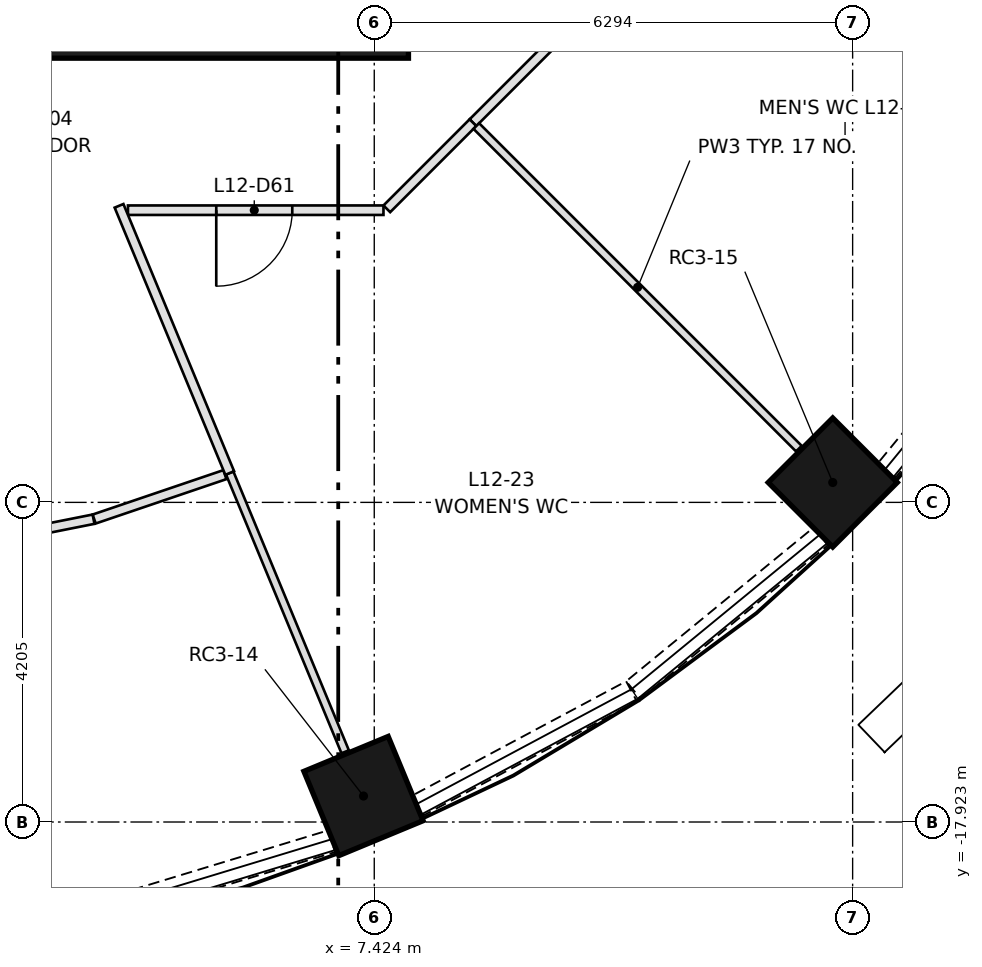
"""IFC4 building model, lengths in metres.
Left out: names, types, materials, properties, quantities, classifications, styles, units other than length and angle.
Written with IfcOpenShell. Run it as: python <this file> out.ifc"""

import sys

from ifc_helpers import new_model, si_unit, direction, frame, frame_2d, origin, origin_2d, place, context, subcontext, project, spatial, rectangle, extrude, element, fill, save


model = new_model("IFC4")
c1 = context("Model", 3, precision=1e-05, world=origin(), true_north=direction((0.0, 1.0)))
c2 = subcontext(c1, "Body", "Model", "MODEL_VIEW")
j1 = project(units=[si_unit("LENGTHUNIT", "METRE"), si_unit("PLANEANGLEUNIT", "RADIAN")], contexts=[c1])
p1 = place(None, origin())
s1 = spatial("IfcSite", under=j1, at=p1, CompositionType="ELEMENT")
p2 = place(p1, origin())
s2 = spatial("IfcBuilding", under=s1, at=p2, CompositionType="ELEMENT")
p3 = place(p2, frame((0.0, 0.0, 48.1)))
s3 = spatial("IfcBuildingStorey", under=s2, at=p3, CompositionType="ELEMENT", Elevation=48.1)
for number, where, z_axis, x_axis in (
    (1, (7.282, -17.582, 0.0), (0.0, 0.0, 1.0), (0.383, -0.924, 0.0)),
    (2, (13.456, -13.456, 0.0), (0.0, 0.0, 1.0), (0.707, -0.707, 0.0)),
):
    element("IfcColumn", number, at=place(p3, frame(where, z_axis=z_axis, x_axis=x_axis)), inside=s3, PredefinedType="COLUMN", context=c2, shape_type="SweptSolid", body=[
        extrude(rectangle(XDim=1.2, YDim=1.2, at=origin_2d()), origin(), (0.0, 0.0, 1.0), 3.65),
    ])
p4 = place(p3, frame((-7.874, -7.424, 0.0), z_axis=(0.0, 0.0, 1.0), x_axis=(1.0, 0.0, 0.0)))
e3 = element("IfcWall", 3, at=p4, inside=s3, PredefinedType="SHEAR", context=c2, shape_type="SweptSolid", body=[
    extrude(rectangle(XDim=15.748, YDim=0.9, at=frame_2d((7.874, 0.0))), origin(), (0.0, 0.0, 1.0), 3.65),
])
p5 = place(p3, frame((3.814, -19.102, 0.0), z_axis=(0.0, 0.0, 1.0), x_axis=(0.956849017819, 0.290585541792, 0.0)))
e4 = element("IfcWall", 4, at=p5, inside=s3, PredefinedType="SOLIDWALL", context=c2, shape_type="SweptSolid", body=[
    extrude(rectangle(XDim=3.188, YDim=0.3, at=frame_2d((1.594, 0.0))), origin(), (0.0, 0.0, 1.0), 0.9),
])
p6 = place(p3, frame((7.998, -17.706, 0.0), z_axis=(0.0, 0.0, 1.0), x_axis=(0.881994263934, 0.471260138764, 0.0)))
e5 = element("IfcWall", 5, at=p6, inside=s3, PredefinedType="SOLIDWALL", context=c2, shape_type="SweptSolid", body=[
    extrude(rectangle(XDim=3.187, YDim=0.3, at=frame_2d((1.593, 0.0))), origin(), (0.0, 0.0, 1.0), 0.9),
])
for number, where, z_axis, x_axis in (
    (6, (10.833, -16.188, 0.0), (0.0, 0.0, 1.0), (0.773, 0.634, 0.0)),
    (7, (14.166, -13.298, 0.0), (0.0, 0.0, 1.0), (0.634, 0.773, 0.0)),
):
    element("IfcWall", number, at=place(p3, frame(where, z_axis=z_axis, x_axis=x_axis)), inside=s3, PredefinedType="SOLIDWALL", context=c2, shape_type="SweptSolid", body=[
        extrude(rectangle(XDim=3.188, YDim=0.3, at=frame_2d((1.594, 0.0))), origin(), (0.0, 0.0, 1.0), 0.9),
    ])
p7 = place(p3, frame((9.856, -7.589, 0.0), z_axis=(0.0, 0.0, 1.0), x_axis=(-0.70718294931, -0.707030604857, 0.0)))
e8 = element("IfcWall", 8, at=p7, inside=s3, PredefinedType="PARTITIONING", context=c2, shape_type="SweptSolid", body=[
    extrude(rectangle(XDim=1.603, YDim=0.125, at=frame_2d((0.801, 0.0))), origin(), (0.0, 0.0, 1.0), 3.3),
])
p8 = place(p3, frame((7.545, -9.874, 0.0), z_axis=(0.0, 0.0, 1.0), x_axis=(-1.0, 0.0, 0.0)))
e9 = element("IfcWall", 9, at=p8, inside=s3, PredefinedType="PARTITIONING", context=c2, shape_type="SweptSolid", body=[
    extrude(rectangle(XDim=3.362, YDim=0.125, at=frame_2d((1.681, 0.0))), origin(), (0.0, 0.0, 1.0), 3.3),
])
p9 = place(p8, frame((1.2, 0.0, 0.0)))
e10 = element("IfcOpeningElement", 10, at=p9, cuts=e9, PredefinedType="OPENING", context=c2, shape_type="SweptSolid", body=[
    extrude(rectangle(XDim=1.0, YDim=2.1, at=frame_2d((0.5, 1.05))), frame((0.0, 0.073, 0.0), z_axis=(0.0, -1.0, 0.0), x_axis=(1.0, 0.0, 0.0)), (0.0, 0.0, 1.0), 0.145),
])
p10 = place(p3, frame((8.722, -8.722, 0.0), z_axis=(0.0, 0.0, 1.0), x_axis=(-0.707030604857, -0.70718294931, 0.0)))
e11 = element("IfcWall", 11, at=p10, inside=s3, PredefinedType="PARTITIONING", context=c2, shape_type="SweptSolid", body=[
    extrude(rectangle(XDim=1.603, YDim=0.125, at=frame_2d((0.801, 0.0))), origin(), (0.0, 0.0, 1.0), 3.3),
])
p11 = place(p3, frame((1.887, -14.306, 0.0), z_axis=(0.0, 0.0, 1.0), x_axis=(0.980804871908, 0.194991803011, 0.0)))
e12 = element("IfcWall", 12, at=p11, inside=s3, PredefinedType="PARTITIONING", context=c2, shape_type="SweptSolid", body=[
    extrude(rectangle(XDim=1.879, YDim=0.125, at=frame_2d((0.94, 0.0))), origin(), (0.0, 0.0, 1.0), 3.3),
])
p12 = place(p3, frame((3.739, -13.937, 0.0), z_axis=(0.0, 0.0, 1.0), x_axis=(0.946921731465, 0.32146420404, 0.0)))
e13 = element("IfcWall", 13, at=p12, inside=s3, PredefinedType="PARTITIONING", context=c2, shape_type="SweptSolid", body=[
    extrude(rectangle(XDim=1.817, YDim=0.125, at=frame_2d((0.908, 0.0))), origin(), (0.0, 0.0, 1.0), 3.3),
])
p13 = place(p3, frame((5.522, -13.332, 0.0), z_axis=(0.0, 0.0, 1.0), x_axis=(0.382675844596, -0.923882675432, 0.0)))
e14 = element("IfcWall", 14, at=p13, inside=s3, PredefinedType="PARTITIONING", context=c2, shape_type="SweptSolid", body=[
    extrude(rectangle(XDim=3.97, YDim=0.105, at=frame_2d((1.985, 0.0))), origin(), (0.0, 0.0, 1.0), 3.3),
])
p14 = place(p3, frame((4.066, -9.816, 0.0), z_axis=(0.0, 0.0, 1.0), x_axis=(0.382746586719, -0.923853370592, 0.0)))
e15 = element("IfcWall", 15, at=p14, inside=s3, PredefinedType="PARTITIONING", context=c2, shape_type="SweptSolid", body=[
    extrude(rectangle(XDim=3.805, YDim=0.125, at=frame_2d((1.902, 0.0))), origin(), (0.0, 0.0, 1.0), 3.3),
])
p15 = place(p3, frame((8.767, -8.767, 0.0), z_axis=(0.0, 0.0, 1.0), x_axis=(0.707106781187, -0.707106781187, 0.0)))
e16 = element("IfcWall", 16, at=p15, inside=s3, PredefinedType="PARTITIONING", context=c2, shape_type="SweptSolid", body=[
    extrude(rectangle(XDim=6.002, YDim=0.105, at=frame_2d((3.001, 0.0))), origin(), (0.0, 0.0, 1.0), 3.3),
])
p16 = place(p9, origin())
e17 = element("IfcDoor", 17, at=p16, inside=s3, OperationType="SINGLE_SWING_RIGHT", PredefinedType="DOOR", context=c2, shape_type="SweptSolid", body=[
    extrude(rectangle(XDim=1.0, YDim=2.1, at=frame_2d((0.5, 1.05))), frame((0.0, 0.025, 0.0), z_axis=(0.0, -1.0, 0.0), x_axis=(1.0, 0.0, 0.0)), (0.0, 0.0, 1.0), 0.05),
])
fill(e10, e17)
save(model, sys.argv[1])
